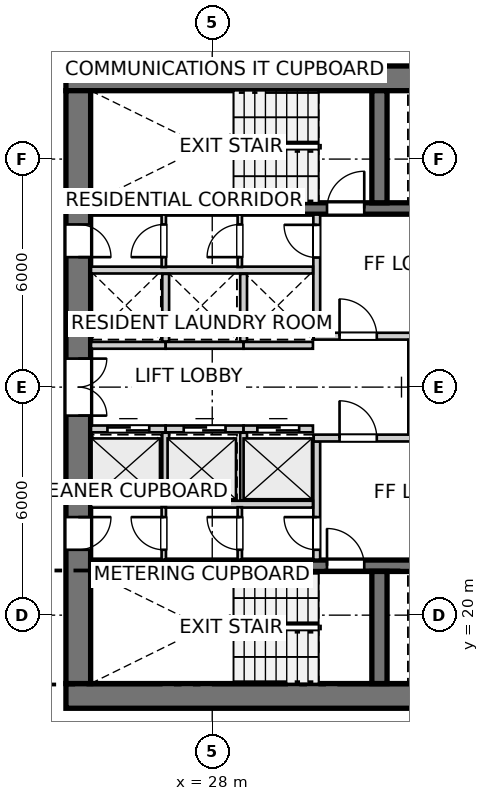
"""IFC4 building model, lengths in metres.
Left out: names, types, materials, properties, quantities, classifications, styles, units other than length and angle.
Written with IfcOpenShell. Run it as: python <this file> out.ifc"""

import sys

from ifc_helpers import new_model, si_unit, direction, frame, frame_2d, origin, place, context, subcontext, project, spatial, rectangle, extrude, source, transform, mapped, element, fill, save


model = new_model("IFC4")
c1 = context("Model", 3, precision=1e-05, world=origin(), true_north=direction((0.0, 1.0)))
c2 = subcontext(c1, "Body", "Model", "MODEL_VIEW")
j1 = project(units=[si_unit("LENGTHUNIT", "METRE"), si_unit("PLANEANGLEUNIT", "RADIAN")], contexts=[c1])
p1 = place(None, origin())
s1 = spatial("IfcSite", under=j1, at=p1, CompositionType="ELEMENT")
p2 = place(p1, origin())
s2 = spatial("IfcBuilding", under=s1, at=p2, CompositionType="ELEMENT")
p3 = place(p2, frame((0.0, 0.0, 118.4)))
s3 = spatial("IfcBuildingStorey", under=s2, at=p3, CompositionType="ELEMENT", Elevation=118.4)
for number, where, z_axis, x_axis in (
    (1, (24.15, 17.875, 0.0), (0.0, 0.0, 1.0), (1.0, 0.0, 0.0)),
    (2, (36.55, 34.125, 0.0), (0.0, 0.0, 1.0), (-1.0, 0.0, 0.0)),
):
    element("IfcWall", number, at=place(p3, frame(where, z_axis=z_axis, x_axis=x_axis)), inside=s3, PredefinedType="SHEAR", context=c2, shape_type="SweptSolid", body=[
        extrude(rectangle(XDim=12.4, YDim=0.65, at=frame_2d((6.2, 0.0))), origin(), (0.0, 0.0, 1.0), 2.95),
    ])
p4 = place(p3, frame((24.475, 33.8, 0.0), z_axis=(0.0, 0.0, 1.0), x_axis=(0.0, -1.0, 0.0)))
e3 = element("IfcWall", 3, at=p4, inside=s3, PredefinedType="SHEAR", context=c2, shape_type="SweptSolid", body=[
    extrude(rectangle(XDim=15.6, YDim=0.65, at=frame_2d((7.8, 0.0))), origin(), (0.0, 0.0, 1.0), 2.95),
])
p5 = place(p4, frame((7.05, 0.0, 0.0)))
e4 = element("IfcOpeningElement", 4, at=p5, cuts=e3, PredefinedType="OPENING", context=c2, shape_type="SweptSolid", body=[
    extrude(rectangle(XDim=1.5, YDim=2.15, at=frame_2d((0.75, 1.075))), frame((0.0, 0.335, 0.0), z_axis=(0.0, -1.0, 0.0), x_axis=(1.0, 0.0, 0.0)), (0.0, 0.0, 1.0), 0.67),
])
p6 = place(p4, frame((3.52, 0.0, 0.0)))
e5 = element("IfcOpeningElement", 5, at=p6, cuts=e3, PredefinedType="OPENING", context=c2, shape_type="SweptSolid", body=[
    extrude(rectangle(XDim=0.86, YDim=2.05, at=frame_2d((0.43, 1.025))), frame((0.0, 0.335, 0.0), z_axis=(0.0, -1.0, 0.0), x_axis=(1.0, 0.0, 0.0)), (0.0, 0.0, 1.0), 0.67),
])
p7 = place(p4, frame((11.22, 0.0, 0.0)))
e6 = element("IfcOpeningElement", 6, at=p7, cuts=e3, PredefinedType="OPENING", context=c2, shape_type="SweptSolid", body=[
    extrude(rectangle(XDim=0.86, YDim=2.05, at=frame_2d((0.43, 1.025))), frame((0.0, 0.335, 0.0), z_axis=(0.0, -1.0, 0.0), x_axis=(1.0, 0.0, 0.0)), (0.0, 0.0, 1.0), 0.67),
])
p8 = place(p3, frame((24.8, 21.3, 0.0), z_axis=(0.0, 0.0, 1.0), x_axis=(1.0, 0.0, 0.0)))
e7 = element("IfcWall", 7, at=p8, inside=s3, PredefinedType="SHEAR", context=c2, shape_type="SweptSolid", body=[
    extrude(rectangle(XDim=11.1, YDim=0.3, at=frame_2d((5.55, 0.0))), origin(), (0.0, 0.0, 1.0), 2.95),
])
p9 = place(p8, frame((6.22, 0.0, 0.0)))
e8 = element("IfcOpeningElement", 8, at=p9, cuts=e7, PredefinedType="OPENING", context=c2, shape_type="SweptSolid", body=[
    extrude(rectangle(XDim=0.98, YDim=2.15, at=frame_2d((0.49, 1.075))), frame((0.0, 0.16, 0.0), z_axis=(0.0, -1.0, 0.0), x_axis=(1.0, 0.0, 0.0)), (0.0, 0.0, 1.0), 0.32),
])
p10 = place(p8, frame((9.15, 0.0, 0.0)))
e9 = element("IfcOpeningElement", 9, at=p10, cuts=e7, PredefinedType="OPENING", context=c2, shape_type="SweptSolid", body=[
    extrude(rectangle(XDim=1.15, YDim=2.15, at=frame_2d((0.575, 1.075))), frame((0.0, 0.16, 0.0), z_axis=(0.0, -1.0, 0.0), x_axis=(1.0, 0.0, 0.0)), (0.0, 0.0, 1.0), 0.32),
])
p11 = place(p3, frame((32.4, 18.2, 0.0), z_axis=(0.0, 0.0, 1.0), x_axis=(0.0, 1.0, 0.0)))
e10 = element("IfcWall", 10, at=p11, inside=s3, PredefinedType="SHEAR", context=c2, shape_type="SweptSolid", body=[
    extrude(rectangle(XDim=2.95, YDim=0.4, at=frame_2d((1.475, 0.0))), origin(), (0.0, 0.0, 1.0), 2.95),
])
p12 = place(p3, frame((24.8, 30.7, 0.0), z_axis=(0.0, 0.0, 1.0), x_axis=(1.0, 0.0, 0.0)))
e11 = element("IfcWall", 11, at=p12, inside=s3, PredefinedType="SHEAR", context=c2, shape_type="SweptSolid", body=[
    extrude(rectangle(XDim=11.1, YDim=0.3, at=frame_2d((5.55, 0.0))), origin(), (0.0, 0.0, 1.0), 2.95),
])
p13 = place(p12, frame((6.22, 0.0, 0.0)))
e12 = element("IfcOpeningElement", 12, at=p13, cuts=e11, PredefinedType="OPENING", context=c2, shape_type="SweptSolid", body=[
    extrude(rectangle(XDim=0.98, YDim=2.15, at=frame_2d((0.49, 1.075))), frame((0.0, 0.16, 0.0), z_axis=(0.0, -1.0, 0.0), x_axis=(1.0, 0.0, 0.0)), (0.0, 0.0, 1.0), 0.32),
])
p14 = place(p12, frame((9.15, 0.0, 0.0)))
e13 = element("IfcOpeningElement", 13, at=p14, cuts=e11, PredefinedType="OPENING", context=c2, shape_type="SweptSolid", body=[
    extrude(rectangle(XDim=1.15, YDim=2.15, at=frame_2d((0.575, 1.075))), frame((0.0, 0.16, 0.0), z_axis=(0.0, -1.0, 0.0), x_axis=(1.0, 0.0, 0.0)), (0.0, 0.0, 1.0), 0.32),
])
p15 = place(p3, frame((32.4, 30.85, 0.0), z_axis=(0.0, 0.0, 1.0), x_axis=(0.0, 1.0, 0.0)))
e14 = element("IfcWall", 14, at=p15, inside=s3, PredefinedType="SHEAR", context=c2, shape_type="SweptSolid", body=[
    extrude(rectangle(XDim=2.95, YDim=0.4, at=frame_2d((1.475, 0.0))), origin(), (0.0, 0.0, 1.0), 2.95),
])
p16 = place(p3, frame((30.75, 21.46, 0.0), z_axis=(0.0, 0.0, 1.0), x_axis=(0.0, 1.0, 0.0)))
e15 = element("IfcWall", 15, at=p16, inside=s3, PredefinedType="PARTITIONING", context=c2, shape_type="SweptSolid", body=[
    extrude(rectangle(XDim=3.11, YDim=0.18, at=frame_2d((1.555, 0.0))), origin(), (0.0, 0.0, 1.0), 2.95),
])
p17 = place(p16, frame((0.26, 0.0, 0.0)))
e16 = element("IfcOpeningElement", 16, at=p17, cuts=e15, PredefinedType="OPENING", context=c2, shape_type="SweptSolid", body=[
    extrude(rectangle(XDim=0.86, YDim=2.05, at=frame_2d((0.43, 1.025))), frame((0.0, 0.1, 0.0), z_axis=(0.0, -1.0, 0.0), x_axis=(1.0, 0.0, 0.0)), (0.0, 0.0, 1.0), 0.2),
])
p18 = place(p3, frame((30.67, 24.66, 0.0), z_axis=(0.0, 0.0, 1.0), x_axis=(1.0, 0.0, 0.0)))
e17 = element("IfcWall", 17, at=p18, inside=s3, PredefinedType="PARTITIONING", context=c2, shape_type="SweptSolid", body=[
    extrude(rectangle(XDim=5.22, YDim=0.18, at=frame_2d((2.61, 0.0))), origin(), (0.0, 0.0, 1.0), 2.95),
])
p19 = place(p18, frame((0.68, 0.0, 0.0)))
e18 = element("IfcOpeningElement", 18, at=p19, cuts=e17, PredefinedType="OPENING", context=c2, shape_type="SweptSolid", body=[
    extrude(rectangle(XDim=0.98, YDim=2.15, at=frame_2d((0.49, 1.075))), frame((0.0, 0.1, 0.0), z_axis=(0.0, -1.0, 0.0), x_axis=(1.0, 0.0, 0.0)), (0.0, 0.0, 1.0), 0.2),
])
p20 = place(p3, frame((30.75, 27.43, 0.0), z_axis=(0.0, 0.0, 1.0), x_axis=(0.0, 1.0, 0.0)))
e19 = element("IfcWall", 19, at=p20, inside=s3, PredefinedType="PARTITIONING", context=c2, shape_type="SweptSolid", body=[
    extrude(rectangle(XDim=3.11, YDim=0.18, at=frame_2d((1.555, 0.0))), origin(), (0.0, 0.0, 1.0), 2.95),
])
p21 = place(p20, frame((1.98, 0.0, 0.0)))
e20 = element("IfcOpeningElement", 20, at=p21, cuts=e19, PredefinedType="OPENING", context=c2, shape_type="SweptSolid", body=[
    extrude(rectangle(XDim=0.86, YDim=2.05, at=frame_2d((0.43, 1.025))), frame((0.0, 0.1, 0.0), z_axis=(0.0, -1.0, 0.0), x_axis=(1.0, 0.0, 0.0)), (0.0, 0.0, 1.0), 0.2),
])
p22 = place(p3, frame((30.67, 27.34, 0.0), z_axis=(0.0, 0.0, 1.0), x_axis=(1.0, 0.0, 0.0)))
e21 = element("IfcWall", 21, at=p22, inside=s3, PredefinedType="PARTITIONING", context=c2, shape_type="SweptSolid", body=[
    extrude(rectangle(XDim=5.22, YDim=0.18, at=frame_2d((2.61, 0.0))), origin(), (0.0, 0.0, 1.0), 2.95),
])
p23 = place(p22, frame((0.68, 0.0, 0.0)))
e22 = element("IfcOpeningElement", 22, at=p23, cuts=e21, PredefinedType="OPENING", context=c2, shape_type="SweptSolid", body=[
    extrude(rectangle(XDim=0.98, YDim=2.15, at=frame_2d((0.49, 1.075))), frame((0.0, 0.1, 0.0), z_axis=(0.0, -1.0, 0.0), x_axis=(1.0, 0.0, 0.0)), (0.0, 0.0, 1.0), 0.2),
])
p24 = place(p3, frame((33.25, 24.76, 0.0), z_axis=(0.0, 0.0, 1.0), x_axis=(0.0, 1.0, 0.0)))
e23 = element("IfcWall", 23, at=p24, inside=s3, PredefinedType="PARTITIONING", context=c2, shape_type="SweptSolid", body=[
    extrude(rectangle(XDim=2.48, YDim=0.18, at=frame_2d((1.24, 0.0))), origin(), (0.0, 0.0, 1.0), 2.95),
])
p25 = place(p24, frame((0.615, 0.0, 0.0)))
e24 = element("IfcOpeningElement", 24, at=p25, cuts=e23, PredefinedType="OPENING", context=c2, shape_type="SweptSolid", body=[
    extrude(rectangle(XDim=1.25, YDim=2.15, at=frame_2d((0.625, 1.075))), frame((0.0, 0.1, 0.0), z_axis=(0.0, -1.0, 0.0), x_axis=(1.0, 0.0, 0.0)), (0.0, 0.0, 1.0), 0.2),
])
p26 = place(p3, frame((24.81, 22.92, 0.0), z_axis=(0.0, 0.0, 1.0), x_axis=(1.0, 0.0, 0.0)))
e25 = element("IfcWall", 25, at=p26, inside=s3, PredefinedType="PARTITIONING", context=c2, shape_type="SweptSolid", body=[
    extrude(rectangle(XDim=5.84, YDim=0.18, at=frame_2d((2.92, 0.0))), origin(), (0.0, 0.0, 1.0), 2.95),
])
p27 = place(p3, frame((24.81, 24.9, 0.0), z_axis=(0.0, 0.0, 1.0), x_axis=(1.0, 0.0, 0.0)))
e26 = element("IfcWall", 26, at=p27, inside=s3, PredefinedType="PARTITIONING", context=c2, shape_type="SweptSolid", body=[
    extrude(rectangle(XDim=1.965, YDim=0.18, at=frame_2d((0.982, 0.0))), origin(), (0.0, 0.0, 1.0), 2.95),
])
p28 = place(p27, frame((0.433, 0.0, 0.0)))
e27 = element("IfcOpeningElement", 27, at=p28, cuts=e26, PredefinedType="OPENING", context=c2, shape_type="SweptSolid", body=[
    extrude(rectangle(XDim=1.1, YDim=2.15, at=frame_2d((0.55, 1.075))), frame((0.0, 0.1, 0.0), z_axis=(0.0, -1.0, 0.0), x_axis=(1.0, 0.0, 0.0)), (0.0, 0.0, 1.0), 0.2),
])
p29 = place(p3, frame((26.775, 24.9, 0.0), z_axis=(0.0, 0.0, 1.0), x_axis=(1.0, 0.0, 0.0)))
e28 = element("IfcWall", 28, at=p29, inside=s3, PredefinedType="PARTITIONING", context=c2, shape_type="SweptSolid", body=[
    extrude(rectangle(XDim=2.05, YDim=0.18, at=frame_2d((1.025, 0.0))), origin(), (0.0, 0.0, 1.0), 2.95),
])
p30 = place(p29, frame((0.475, 0.0, 0.0)))
e29 = element("IfcOpeningElement", 29, at=p30, cuts=e28, PredefinedType="OPENING", context=c2, shape_type="SweptSolid", body=[
    extrude(rectangle(XDim=1.1, YDim=2.15, at=frame_2d((0.55, 1.075))), frame((0.0, 0.1, 0.0), z_axis=(0.0, -1.0, 0.0), x_axis=(1.0, 0.0, 0.0)), (0.0, 0.0, 1.0), 0.2),
])
p31 = place(p3, frame((26.775, 23.02, 0.0), z_axis=(0.0, 0.0, 1.0), x_axis=(0.0, 1.0, 0.0)))
e30 = element("IfcWall", 30, at=p31, inside=s3, PredefinedType="PARTITIONING", context=c2, shape_type="SweptSolid", body=[
    extrude(rectangle(XDim=1.78, YDim=0.18, at=frame_2d((0.89, 0.0))), origin(), (0.0, 0.0, 1.0), 2.95),
])
p32 = place(p3, frame((28.825, 24.9, 0.0), z_axis=(0.0, 0.0, 1.0), x_axis=(1.0, 0.0, 0.0)))
e31 = element("IfcWall", 31, at=p32, inside=s3, PredefinedType="PARTITIONING", context=c2, shape_type="SweptSolid", body=[
    extrude(rectangle(XDim=1.825, YDim=0.18, at=frame_2d((0.913, 0.0))), origin(), (0.0, 0.0, 1.0), 2.95),
])
p33 = place(p32, frame((0.363, 0.0, 0.0)))
e32 = element("IfcOpeningElement", 32, at=p33, cuts=e31, PredefinedType="OPENING", context=c2, shape_type="SweptSolid", body=[
    extrude(rectangle(XDim=1.1, YDim=2.15, at=frame_2d((0.55, 1.075))), frame((0.0, 0.1, 0.0), z_axis=(0.0, -1.0, 0.0), x_axis=(1.0, 0.0, 0.0)), (0.0, 0.0, 1.0), 0.2),
])
p34 = place(p3, frame((28.825, 23.02, 0.0), z_axis=(0.0, 0.0, 1.0), x_axis=(0.0, 1.0, 0.0)))
e33 = element("IfcWall", 33, at=p34, inside=s3, PredefinedType="PARTITIONING", context=c2, shape_type="SweptSolid", body=[
    extrude(rectangle(XDim=1.78, YDim=0.18, at=frame_2d((0.89, 0.0))), origin(), (0.0, 0.0, 1.0), 2.95),
])
p35 = place(p3, frame((24.81, 29.08, 0.0), z_axis=(0.0, 0.0, 1.0), x_axis=(1.0, 0.0, 0.0)))
e34 = element("IfcWall", 34, at=p35, inside=s3, PredefinedType="PARTITIONING", context=c2, shape_type="SweptSolid", body=[
    extrude(rectangle(XDim=5.84, YDim=0.18, at=frame_2d((2.92, 0.0))), origin(), (0.0, 0.0, 1.0), 2.95),
])
p36 = place(p3, frame((24.81, 27.1, 0.0), z_axis=(0.0, 0.0, 1.0), x_axis=(1.0, 0.0, 0.0)))
e35 = element("IfcWall", 35, at=p36, inside=s3, PredefinedType="PARTITIONING", context=c2, shape_type="SweptSolid", body=[
    extrude(rectangle(XDim=1.965, YDim=0.18, at=frame_2d((0.982, 0.0))), origin(), (0.0, 0.0, 1.0), 2.95),
])
p37 = place(p3, frame((26.775, 27.1, 0.0), z_axis=(0.0, 0.0, 1.0), x_axis=(1.0, 0.0, 0.0)))
e36 = element("IfcWall", 36, at=p37, inside=s3, PredefinedType="PARTITIONING", context=c2, shape_type="SweptSolid", body=[
    extrude(rectangle(XDim=2.05, YDim=0.18, at=frame_2d((1.025, 0.0))), origin(), (0.0, 0.0, 1.0), 2.95),
])
p38 = place(p3, frame((26.775, 27.2, 0.0), z_axis=(0.0, 0.0, 1.0), x_axis=(0.0, 1.0, 0.0)))
e37 = element("IfcWall", 37, at=p38, inside=s3, PredefinedType="PARTITIONING", context=c2, shape_type="SweptSolid", body=[
    extrude(rectangle(XDim=1.78, YDim=0.18, at=frame_2d((0.89, 0.0))), origin(), (0.0, 0.0, 1.0), 2.95),
])
p39 = place(p3, frame((28.825, 27.1, 0.0), z_axis=(0.0, 0.0, 1.0), x_axis=(1.0, 0.0, 0.0)))
e38 = element("IfcWall", 38, at=p39, inside=s3, PredefinedType="PARTITIONING", context=c2, shape_type="SweptSolid", body=[
    extrude(rectangle(XDim=1.825, YDim=0.18, at=frame_2d((0.913, 0.0))), origin(), (0.0, 0.0, 1.0), 2.95),
])
p40 = place(p3, frame((28.825, 27.2, 0.0), z_axis=(0.0, 0.0, 1.0), x_axis=(0.0, 1.0, 0.0)))
e39 = element("IfcWall", 39, at=p40, inside=s3, PredefinedType="PARTITIONING", context=c2, shape_type="SweptSolid", body=[
    extrude(rectangle(XDim=1.78, YDim=0.18, at=frame_2d((0.89, 0.0))), origin(), (0.0, 0.0, 1.0), 2.95),
])
p41 = place(p3, frame((26.725, 21.46, 0.0), z_axis=(0.0, 0.0, 1.0), x_axis=(0.0, 1.0, 0.0)))
e40 = element("IfcWall", 40, at=p41, inside=s3, PredefinedType="PARTITIONING", context=c2, shape_type="SweptSolid", body=[
    extrude(rectangle(XDim=1.38, YDim=0.115, at=frame_2d((0.69, 0.0))), origin(), (0.0, 0.0, 1.0), 2.95),
])
p42 = place(p41, frame((0.26, 0.0, 0.0)))
e41 = element("IfcOpeningElement", 41, at=p42, cuts=e40, PredefinedType="OPENING", context=c2, shape_type="SweptSolid", body=[
    extrude(rectangle(XDim=0.86, YDim=2.05, at=frame_2d((0.43, 1.025))), frame((0.0, 0.067, 0.0), z_axis=(0.0, -1.0, 0.0), x_axis=(1.0, 0.0, 0.0)), (0.0, 0.0, 1.0), 0.135),
])
p43 = place(p3, frame((26.725, 29.16, 0.0), z_axis=(0.0, 0.0, 1.0), x_axis=(0.0, 1.0, 0.0)))
e42 = element("IfcWall", 42, at=p43, inside=s3, PredefinedType="PARTITIONING", context=c2, shape_type="SweptSolid", body=[
    extrude(rectangle(XDim=1.38, YDim=0.115, at=frame_2d((0.69, 0.0))), origin(), (0.0, 0.0, 1.0), 2.95),
])
p44 = place(p43, frame((0.26, 0.0, 0.0)))
e43 = element("IfcOpeningElement", 43, at=p44, cuts=e42, PredefinedType="OPENING", context=c2, shape_type="SweptSolid", body=[
    extrude(rectangle(XDim=0.86, YDim=2.05, at=frame_2d((0.43, 1.025))), frame((0.0, 0.067, 0.0), z_axis=(0.0, -1.0, 0.0), x_axis=(1.0, 0.0, 0.0)), (0.0, 0.0, 1.0), 0.135),
])
p45 = place(p3, frame((28.725, 21.46, 0.0), z_axis=(0.0, 0.0, 1.0), x_axis=(0.0, 1.0, 0.0)))
e44 = element("IfcWall", 44, at=p45, inside=s3, PredefinedType="PARTITIONING", context=c2, shape_type="SweptSolid", body=[
    extrude(rectangle(XDim=1.38, YDim=0.115, at=frame_2d((0.69, 0.0))), origin(), (0.0, 0.0, 1.0), 2.95),
])
p46 = place(p45, frame((0.26, 0.0, 0.0)))
e45 = element("IfcOpeningElement", 45, at=p46, cuts=e44, PredefinedType="OPENING", context=c2, shape_type="SweptSolid", body=[
    extrude(rectangle(XDim=0.86, YDim=2.05, at=frame_2d((0.43, 1.025))), frame((0.0, 0.067, 0.0), z_axis=(0.0, -1.0, 0.0), x_axis=(1.0, 0.0, 0.0)), (0.0, 0.0, 1.0), 0.135),
])
p47 = place(p3, frame((28.725, 29.16, 0.0), z_axis=(0.0, 0.0, 1.0), x_axis=(0.0, 1.0, 0.0)))
e46 = element("IfcWall", 46, at=p47, inside=s3, PredefinedType="PARTITIONING", context=c2, shape_type="SweptSolid", body=[
    extrude(rectangle(XDim=1.38, YDim=0.115, at=frame_2d((0.69, 0.0))), origin(), (0.0, 0.0, 1.0), 2.95),
])
p48 = place(p47, frame((0.26, 0.0, 0.0)))
e47 = element("IfcOpeningElement", 47, at=p48, cuts=e46, PredefinedType="OPENING", context=c2, shape_type="SweptSolid", body=[
    extrude(rectangle(XDim=0.86, YDim=2.05, at=frame_2d((0.43, 1.025))), frame((0.0, 0.067, 0.0), z_axis=(0.0, -1.0, 0.0), x_axis=(1.0, 0.0, 0.0)), (0.0, 0.0, 1.0), 0.135),
])
m1 = source(origin(), c2, "Body", "SweptSolid", [
    extrude(rectangle(XDim=0.98, YDim=2.15, at=frame_2d((0.49, 1.075))), frame((0.0, 0.025, 0.0), z_axis=(0.0, -1.0, 0.0), x_axis=(1.0, 0.0, 0.0)), (0.0, 0.0, 1.0), 0.05),
])
p49 = place(p9, origin())
e48 = element("IfcDoor", 48, at=p49, inside=s3, OperationType="SINGLE_SWING_LEFT", PredefinedType="DOOR", context=c2, shape_type="MappedRepresentation", body=[
    mapped(m1, transform((0.0, 0.0, 0.0), x_axis=(1.0, 0.0, 0.0), y_axis=(0.0, 1.0, 0.0), z_axis=(0.0, 0.0, 1.0), scale=1.0)),
])
fill(e8, e48)
p50 = place(p13, origin())
e49 = element("IfcDoor", 49, at=p50, inside=s3, OperationType="SINGLE_SWING_RIGHT", PredefinedType="DOOR", context=c2, shape_type="MappedRepresentation", body=[
    mapped(m1, transform((0.0, 0.0, 0.0), x_axis=(1.0, 0.0, 0.0), y_axis=(0.0, 1.0, 0.0), z_axis=(0.0, 0.0, 1.0), scale=1.0)),
])
fill(e12, e49)
m2 = source(origin(), c2, "Body", "SweptSolid", [
    extrude(rectangle(XDim=1.5, YDim=2.15, at=frame_2d((0.75, 1.075))), frame((0.0, 0.025, 0.0), z_axis=(0.0, -1.0, 0.0), x_axis=(1.0, 0.0, 0.0)), (0.0, 0.0, 1.0), 0.05),
])
p51 = place(p5, origin())
e50 = element("IfcDoor", 50, at=p51, inside=s3, OperationType="DOUBLE_DOOR_SINGLE_SWING", PredefinedType="DOOR", context=c2, shape_type="MappedRepresentation", body=[
    mapped(m2, transform((0.0, 0.0, 0.0), x_axis=(1.0, 0.0, 0.0), y_axis=(0.0, 1.0, 0.0), z_axis=(0.0, 0.0, 1.0), scale=1.0)),
])
fill(e4, e50)
m3 = source(origin(), c2, "Body", "SweptSolid", [
    extrude(rectangle(XDim=0.86, YDim=2.05, at=frame_2d((0.43, 1.025))), frame((0.0, 0.025, 0.0), z_axis=(0.0, -1.0, 0.0), x_axis=(1.0, 0.0, 0.0)), (0.0, 0.0, 1.0), 0.05),
])
p52 = place(p6, origin())
e51 = element("IfcDoor", 51, at=p52, inside=s3, OperationType="SINGLE_SWING_RIGHT", PredefinedType="DOOR", context=c2, shape_type="MappedRepresentation", body=[
    mapped(m3, transform((0.0, 0.0, 0.0), x_axis=(1.0, 0.0, 0.0), y_axis=(0.0, 1.0, 0.0), z_axis=(0.0, 0.0, 1.0), scale=1.0)),
])
fill(e5, e51)
p53 = place(p7, origin())
e52 = element("IfcDoor", 52, at=p53, inside=s3, OperationType="SINGLE_SWING_LEFT", PredefinedType="DOOR", context=c2, shape_type="MappedRepresentation", body=[
    mapped(m3, transform((0.0, 0.0, 0.0), x_axis=(1.0, 0.0, 0.0), y_axis=(0.0, 1.0, 0.0), z_axis=(0.0, 0.0, 1.0), scale=1.0)),
])
fill(e6, e52)
p54 = place(p17, origin())
e53 = element("IfcDoor", 53, at=p54, inside=s3, OperationType="SINGLE_SWING_RIGHT", PredefinedType="DOOR", context=c2, shape_type="MappedRepresentation", body=[
    mapped(m3, transform((0.0, 0.0, 0.0), x_axis=(1.0, 0.0, 0.0), y_axis=(0.0, 1.0, 0.0), z_axis=(0.0, 0.0, 1.0), scale=1.0)),
])
fill(e16, e53)
p55 = place(p19, origin())
e54 = element("IfcDoor", 54, at=p55, inside=s3, OperationType="SINGLE_SWING_LEFT", PredefinedType="DOOR", context=c2, shape_type="MappedRepresentation", body=[
    mapped(m1, transform((0.0, 0.0, 0.0), x_axis=(1.0, 0.0, 0.0), y_axis=(0.0, 1.0, 0.0), z_axis=(0.0, 0.0, 1.0), scale=1.0)),
])
fill(e18, e54)
p56 = place(p21, origin())
e55 = element("IfcDoor", 55, at=p56, inside=s3, OperationType="SINGLE_SWING_RIGHT", PredefinedType="DOOR", context=c2, shape_type="MappedRepresentation", body=[
    mapped(m3, transform((0.0, 0.0, 0.0), x_axis=(1.0, 0.0, 0.0), y_axis=(0.0, 1.0, 0.0), z_axis=(0.0, 0.0, 1.0), scale=1.0)),
])
fill(e20, e55)
p57 = place(p23, origin())
e56 = element("IfcDoor", 56, at=p57, inside=s3, OperationType="SINGLE_SWING_LEFT", PredefinedType="DOOR", context=c2, shape_type="MappedRepresentation", body=[
    mapped(m1, transform((0.0, 0.0, 0.0), x_axis=(1.0, 0.0, 0.0), y_axis=(0.0, 1.0, 0.0), z_axis=(0.0, 0.0, 1.0), scale=1.0)),
])
fill(e22, e56)
m4 = source(origin(), c2, "Body", "SweptSolid", [
    extrude(rectangle(XDim=1.1, YDim=2.15, at=frame_2d((0.55, 1.075))), frame((0.0, 0.025, 0.0), z_axis=(0.0, -1.0, 0.0), x_axis=(1.0, 0.0, 0.0)), (0.0, 0.0, 1.0), 0.05),
])
p58 = place(p28, origin())
e57 = element("IfcDoor", 57, at=p58, inside=s3, OperationType="DOUBLE_DOOR_SLIDING", PredefinedType="DOOR", context=c2, shape_type="MappedRepresentation", body=[
    mapped(m4, transform((0.0, 0.0, 0.0), x_axis=(1.0, 0.0, 0.0), y_axis=(0.0, 1.0, 0.0), z_axis=(0.0, 0.0, 1.0), scale=1.0)),
])
fill(e27, e57)
p59 = place(p30, origin())
e58 = element("IfcDoor", 58, at=p59, inside=s3, OperationType="DOUBLE_DOOR_SLIDING", PredefinedType="DOOR", context=c2, shape_type="MappedRepresentation", body=[
    mapped(m4, transform((0.0, 0.0, 0.0), x_axis=(1.0, 0.0, 0.0), y_axis=(0.0, 1.0, 0.0), z_axis=(0.0, 0.0, 1.0), scale=1.0)),
])
fill(e29, e58)
p60 = place(p33, origin())
e59 = element("IfcDoor", 59, at=p60, inside=s3, OperationType="DOUBLE_DOOR_SLIDING", PredefinedType="DOOR", context=c2, shape_type="MappedRepresentation", body=[
    mapped(m4, transform((0.0, 0.0, 0.0), x_axis=(1.0, 0.0, 0.0), y_axis=(0.0, 1.0, 0.0), z_axis=(0.0, 0.0, 1.0), scale=1.0)),
])
fill(e32, e59)
p61 = place(p42, origin())
e60 = element("IfcDoor", 60, at=p61, inside=s3, OperationType="SINGLE_SWING_RIGHT", PredefinedType="DOOR", context=c2, shape_type="MappedRepresentation", body=[
    mapped(m3, transform((0.0, 0.0, 0.0), x_axis=(1.0, 0.0, 0.0), y_axis=(0.0, 1.0, 0.0), z_axis=(0.0, 0.0, 1.0), scale=1.0)),
])
fill(e41, e60)
p62 = place(p44, origin())
e61 = element("IfcDoor", 61, at=p62, inside=s3, OperationType="SINGLE_SWING_LEFT", PredefinedType="DOOR", context=c2, shape_type="MappedRepresentation", body=[
    mapped(m3, transform((0.0, 0.0, 0.0), x_axis=(1.0, 0.0, 0.0), y_axis=(0.0, 1.0, 0.0), z_axis=(0.0, 0.0, 1.0), scale=1.0)),
])
fill(e43, e61)
p63 = place(p46, origin())
e62 = element("IfcDoor", 62, at=p63, inside=s3, OperationType="SINGLE_SWING_RIGHT", PredefinedType="DOOR", context=c2, shape_type="MappedRepresentation", body=[
    mapped(m3, transform((0.0, 0.0, 0.0), x_axis=(1.0, 0.0, 0.0), y_axis=(0.0, 1.0, 0.0), z_axis=(0.0, 0.0, 1.0), scale=1.0)),
])
fill(e45, e62)
p64 = place(p48, origin())
e63 = element("IfcDoor", 63, at=p64, inside=s3, OperationType="SINGLE_SWING_LEFT", PredefinedType="DOOR", context=c2, shape_type="MappedRepresentation", body=[
    mapped(m3, transform((0.0, 0.0, 0.0), x_axis=(1.0, 0.0, 0.0), y_axis=(0.0, 1.0, 0.0), z_axis=(0.0, 0.0, 1.0), scale=1.0)),
])
fill(e47, e63)
save(model, sys.argv[1])
